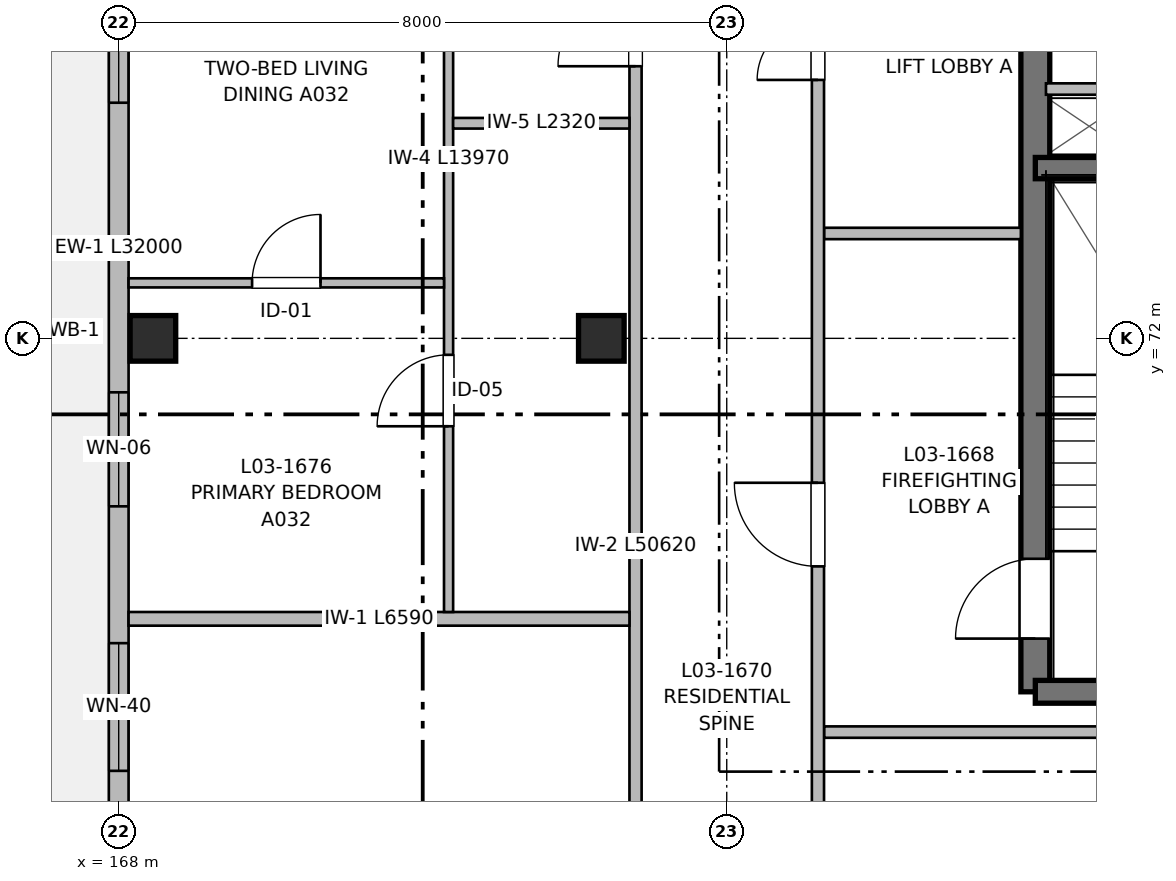
"""IFC4 building model, lengths in metres.
Left out: names, types, materials, properties, quantities, classifications, styles, units other than length and angle.
Written with IfcOpenShell. Run it as: python <this file> out.ifc"""

import sys

from ifc_helpers import new_model, si_unit, direction, frame, frame_2d, origin, origin_2d, place, context, subcontext, project, spatial, rectangle, extrude, element, fill, save


model = new_model("IFC4")
c1 = context("Model", 3, precision=1e-05, world=origin(), true_north=direction((0.0, 1.0)))
c2 = subcontext(c1, "Body", "Model", "MODEL_VIEW")
j1 = project(units=[si_unit("LENGTHUNIT", "METRE"), si_unit("PLANEANGLEUNIT", "RADIAN")], contexts=[c1])
p1 = place(None, origin())
s1 = spatial("IfcSite", under=j1, at=p1, CompositionType="ELEMENT")
p2 = place(p1, origin())
s2 = spatial("IfcBuilding", under=s1, at=p2, CompositionType="ELEMENT")
p3 = place(p2, frame((0.0, 0.0, 10.56)))
s3 = spatial("IfcBuildingStorey", under=s2, at=p3, CompositionType="ELEMENT", Elevation=10.56)
for number, where, z_axis, x_axis in (
    (1, (168.45, 72.0, 0.0), (0.0, 0.0, 1.0), (1.0, 0.0, 0.0)),
    (2, (174.35, 72.0, 0.0), (0.0, 0.0, 1.0), (1.0, 0.0, 0.0)),
):
    element("IfcColumn", number, at=place(p3, frame(where, z_axis=z_axis, x_axis=x_axis)), inside=s3, PredefinedType="COLUMN", context=c2, shape_type="SweptSolid", body=[
        extrude(rectangle(XDim=0.6, YDim=0.6, at=origin_2d()), origin(), (0.0, 0.0, 1.0), 3.2),
    ])
p4 = place(p3, frame((180.06, 67.35, 0.0), z_axis=(0.0, 0.0, 1.0), x_axis=(0.0, 1.0, 0.0)))
e3 = element("IfcWall", 3, at=p4, inside=s3, PredefinedType="SHEAR", context=c2, shape_type="SweptSolid", body=[
    extrude(rectangle(XDim=13.15, YDim=0.38, at=frame_2d((6.575, 0.0))), origin(), (0.0, 0.0, 1.0), 3.2),
])
p5 = place(p4, frame((0.7, 0.0, 0.0)))
e4 = element("IfcOpeningElement", 4, at=p5, cuts=e3, PredefinedType="OPENING", context=c2, shape_type="SweptSolid", body=[
    extrude(rectangle(XDim=1.05, YDim=2.15, at=frame_2d((0.525, 1.075))), frame((0.0, 0.2, 0.0), z_axis=(0.0, -1.0, 0.0), x_axis=(1.0, 0.0, 0.0)), (0.0, 0.0, 1.0), 0.4),
])
p6 = place(p3, frame((183.47, 67.35, 0.0), z_axis=(0.0, 0.0, 1.0), x_axis=(-1.0, 0.0, 0.0)))
e5 = element("IfcWall", 5, at=p6, inside=s3, PredefinedType="SHEAR", context=c2, shape_type="SweptSolid", body=[
    extrude(rectangle(XDim=3.41, YDim=0.3, at=frame_2d((1.705, 0.0))), origin(), (0.0, 0.0, 1.0), 3.2),
])
p7 = place(p3, frame((180.06, 74.24, 0.0), z_axis=(0.0, 0.0, 1.0), x_axis=(1.0, 0.0, 0.0)))
e6 = element("IfcWall", 6, at=p7, inside=s3, PredefinedType="SHEAR", context=c2, shape_type="SweptSolid", body=[
    extrude(rectangle(XDim=3.41, YDim=0.28, at=frame_2d((1.705, 0.0))), origin(), (0.0, 0.0, 1.0), 3.2),
])
p8 = place(p3, frame((180.2, 75.28, 0.0), z_axis=(0.0, 0.0, 1.0), x_axis=(1.0, 0.0, 0.0)))
e7 = element("IfcWall", 7, at=p8, inside=s3, PredefinedType="PARTITIONING", context=c2, shape_type="SweptSolid", body=[
    extrude(rectangle(XDim=1.13, YDim=0.15, at=frame_2d((0.565, 0.0))), origin(), (0.0, 0.0, 1.0), 2.95),
])
p9 = place(p3, frame((168.0, 56.0, 0.0), z_axis=(0.0, 0.0, 1.0), x_axis=(0.0, 1.0, 0.0)))
e8 = element("IfcWall", 8, at=p9, inside=s3, PredefinedType="SOLIDWALL", context=c2, shape_type="SweptSolid", body=[
    extrude(rectangle(XDim=32.0, YDim=0.26, at=frame_2d((16.0, 0.0))), origin(), (0.0, 0.0, 1.0), 2.98),
])
p10 = place(p9, frame((3.4, 0.0, 0.0)))
e9 = element("IfcOpeningElement", 9, at=p10, cuts=e8, PredefinedType="OPENING", context=c2, shape_type="SweptSolid", body=[
    extrude(rectangle(XDim=1.2, YDim=2.2, at=frame_2d((0.6, 1.1))), frame((0.0, 0.14, 0.0), z_axis=(0.0, -1.0, 0.0), x_axis=(1.0, 0.0, 0.0)), (0.0, 0.0, 1.0), 0.28),
])
p11 = place(p9, frame((5.3, 0.0, 0.87)))
e10 = element("IfcOpeningElement", 10, at=p11, cuts=e8, PredefinedType="OPENING", context=c2, shape_type="SweptSolid", body=[
    extrude(rectangle(XDim=1.4, YDim=1.35, at=frame_2d((0.7, 0.675))), frame((0.0, 0.14, 0.0), z_axis=(0.0, -1.0, 0.0), x_axis=(1.0, 0.0, 0.0)), (0.0, 0.0, 1.0), 0.28),
])
p12 = place(p9, frame((10.31, 0.0, 0.72)))
e11 = element("IfcOpeningElement", 11, at=p12, cuts=e8, PredefinedType="OPENING", context=c2, shape_type="SweptSolid", body=[
    extrude(rectangle(XDim=1.68, YDim=1.5, at=frame_2d((0.84, 0.75))), frame((0.0, 0.14, 0.0), z_axis=(0.0, -1.0, 0.0), x_axis=(1.0, 0.0, 0.0)), (0.0, 0.0, 1.0), 0.28),
])
p13 = place(p9, frame((19.1, 0.0, 0.72)))
e12 = element("IfcOpeningElement", 12, at=p13, cuts=e8, PredefinedType="OPENING", context=c2, shape_type="SweptSolid", body=[
    extrude(rectangle(XDim=1.8, YDim=1.5, at=frame_2d((0.9, 0.75))), frame((0.0, 0.14, 0.0), z_axis=(0.0, -1.0, 0.0), x_axis=(1.0, 0.0, 0.0)), (0.0, 0.0, 1.0), 0.28),
])
p14 = place(p9, frame((27.0, 0.0, 0.72)))
e13 = element("IfcOpeningElement", 13, at=p14, cuts=e8, PredefinedType="OPENING", context=c2, shape_type="SweptSolid", body=[
    extrude(rectangle(XDim=2.0, YDim=1.5, at=frame_2d((1.0, 0.75))), frame((0.0, 0.14, 0.0), z_axis=(0.0, -1.0, 0.0), x_axis=(1.0, 0.0, 0.0)), (0.0, 0.0, 1.0), 0.28),
])
p15 = place(p9, frame((13.79, 0.0, 0.82)))
e14 = element("IfcOpeningElement", 14, at=p15, cuts=e8, PredefinedType="OPENING", context=c2, shape_type="SweptSolid", body=[
    extrude(rectangle(XDim=1.5, YDim=1.4, at=frame_2d((0.75, 0.7))), frame((0.0, 0.14, 0.0), z_axis=(0.0, -1.0, 0.0), x_axis=(1.0, 0.0, 0.0)), (0.0, 0.0, 1.0), 0.28),
])
p16 = place(p9, frame((24.43, 0.0, 0.82)))
e15 = element("IfcOpeningElement", 15, at=p16, cuts=e8, PredefinedType="OPENING", context=c2, shape_type="SweptSolid", body=[
    extrude(rectangle(XDim=1.5, YDim=1.4, at=frame_2d((0.75, 0.7))), frame((0.0, 0.14, 0.0), z_axis=(0.0, -1.0, 0.0), x_axis=(1.0, 0.0, 0.0)), (0.0, 0.0, 1.0), 0.28),
])
p17 = place(p9, frame((30.895, 0.0, 0.9)))
e16 = element("IfcOpeningElement", 16, at=p17, cuts=e8, PredefinedType="OPENING", context=c2, shape_type="SweptSolid", body=[
    extrude(rectangle(XDim=0.65, YDim=0.95, at=frame_2d((0.325, 0.475))), frame((0.0, 0.14, 0.0), z_axis=(0.0, -1.0, 0.0), x_axis=(1.0, 0.0, 0.0)), (0.0, 0.0, 1.0), 0.28),
])
p18 = place(p3, frame((177.28, 66.82, 0.0), z_axis=(0.0, 0.0, 1.0), x_axis=(1.0, 0.0, 0.0)))
e17 = element("IfcWall", 17, at=p18, inside=s3, PredefinedType="PARTITIONING", context=c2, shape_type="SweptSolid", body=[
    extrude(rectangle(XDim=6.59, YDim=0.15, at=frame_2d((3.295, 0.0))), origin(), (0.0, 0.0, 1.0), 2.935),
])
p19 = place(p3, frame((177.28, 73.38, 0.0), z_axis=(0.0, 0.0, 1.0), x_axis=(1.0, 0.0, 0.0)))
e18 = element("IfcWall", 18, at=p19, inside=s3, PredefinedType="PARTITIONING", context=c2, shape_type="SweptSolid", body=[
    extrude(rectangle(XDim=2.59, YDim=0.15, at=frame_2d((1.295, 0.0))), origin(), (0.0, 0.0, 1.0), 2.935),
])
p20 = place(p3, frame((174.8, 56.18, 0.0), z_axis=(0.0, 0.0, 1.0), x_axis=(0.0, 1.0, 0.0)))
e19 = element("IfcWall", 19, at=p20, inside=s3, PredefinedType="PARTITIONING", context=c2, shape_type="SweptSolid", body=[
    extrude(rectangle(XDim=50.62, YDim=0.16, at=frame_2d((25.31, 0.0))), origin(), (0.0, 0.0, 1.0), 2.935),
])
p21 = place(p20, frame((5.27, 0.0, 0.0)))
e20 = element("IfcOpeningElement", 20, at=p21, cuts=e19, PredefinedType="OPENING", context=c2, shape_type="SweptSolid", body=[
    extrude(rectangle(XDim=1.5, YDim=2.2, at=frame_2d((0.75, 1.1))), frame((0.0, 0.09, 0.0), z_axis=(0.0, -1.0, 0.0), x_axis=(1.0, 0.0, 0.0)), (0.0, 0.0, 1.0), 0.18),
])
p22 = place(p20, frame((19.4, 0.0, 0.0)))
e21 = element("IfcOpeningElement", 21, at=p22, cuts=e19, PredefinedType="OPENING", context=c2, shape_type="SweptSolid", body=[
    extrude(rectangle(XDim=1.02, YDim=2.15, at=frame_2d((0.51, 1.075))), frame((0.0, 0.09, 0.0), z_axis=(0.0, -1.0, 0.0), x_axis=(1.0, 0.0, 0.0)), (0.0, 0.0, 1.0), 0.18),
])
p23 = place(p20, frame((33.08, 0.0, 0.0)))
e22 = element("IfcOpeningElement", 22, at=p23, cuts=e19, PredefinedType="OPENING", context=c2, shape_type="SweptSolid", body=[
    extrude(rectangle(XDim=0.98, YDim=2.15, at=frame_2d((0.49, 1.075))), frame((0.0, 0.09, 0.0), z_axis=(0.0, -1.0, 0.0), x_axis=(1.0, 0.0, 0.0)), (0.0, 0.0, 1.0), 0.18),
])
p24 = place(p20, frame((45.33, 0.0, 0.0)))
e23 = element("IfcOpeningElement", 23, at=p24, cuts=e19, PredefinedType="OPENING", context=c2, shape_type="SweptSolid", body=[
    extrude(rectangle(XDim=0.98, YDim=2.15, at=frame_2d((0.49, 1.075))), frame((0.0, 0.09, 0.0), z_axis=(0.0, -1.0, 0.0), x_axis=(1.0, 0.0, 0.0)), (0.0, 0.0, 1.0), 0.18),
])
p25 = place(p3, frame((177.2, 56.18, 0.0), z_axis=(0.0, 0.0, 1.0), x_axis=(0.0, 1.0, 0.0)))
e24 = element("IfcWall", 24, at=p25, inside=s3, PredefinedType="PARTITIONING", context=c2, shape_type="SweptSolid", body=[
    extrude(rectangle(XDim=50.62, YDim=0.16, at=frame_2d((25.31, 0.0))), origin(), (0.0, 0.0, 1.0), 2.935),
])
p26 = place(p25, frame((12.82, 0.0, 0.0)))
e25 = element("IfcOpeningElement", 25, at=p26, cuts=e24, PredefinedType="OPENING", context=c2, shape_type="SweptSolid", body=[
    extrude(rectangle(XDim=1.1, YDim=2.15, at=frame_2d((0.55, 1.075))), frame((0.0, 0.09, 0.0), z_axis=(0.0, -1.0, 0.0), x_axis=(1.0, 0.0, 0.0)), (0.0, 0.0, 1.0), 0.18),
])
p27 = place(p25, frame((19.22, 0.0, 0.0)))
e26 = element("IfcOpeningElement", 26, at=p27, cuts=e24, PredefinedType="OPENING", context=c2, shape_type="SweptSolid", body=[
    extrude(rectangle(XDim=1.6, YDim=2.15, at=frame_2d((0.8, 1.075))), frame((0.0, 0.09, 0.0), z_axis=(0.0, -1.0, 0.0), x_axis=(1.0, 0.0, 0.0)), (0.0, 0.0, 1.0), 0.18),
])
p28 = place(p25, frame((1.8, 0.0, 0.0)))
e27 = element("IfcOpeningElement", 27, at=p28, cuts=e24, PredefinedType="OPENING", context=c2, shape_type="SweptSolid", body=[
    extrude(rectangle(XDim=0.96, YDim=2.15, at=frame_2d((0.48, 1.075))), frame((0.0, 0.09, 0.0), z_axis=(0.0, -1.0, 0.0), x_axis=(1.0, 0.0, 0.0)), (0.0, 0.0, 1.0), 0.18),
])
p29 = place(p25, frame((32.55, 0.0, 0.0)))
e28 = element("IfcOpeningElement", 28, at=p29, cuts=e24, PredefinedType="OPENING", context=c2, shape_type="SweptSolid", body=[
    extrude(rectangle(XDim=0.98, YDim=2.15, at=frame_2d((0.49, 1.075))), frame((0.0, 0.09, 0.0), z_axis=(0.0, -1.0, 0.0), x_axis=(1.0, 0.0, 0.0)), (0.0, 0.0, 1.0), 0.18),
])
p30 = place(p25, frame((40.81, 0.0, 0.0)))
e29 = element("IfcOpeningElement", 29, at=p30, cuts=e24, PredefinedType="OPENING", context=c2, shape_type="SweptSolid", body=[
    extrude(rectangle(XDim=0.98, YDim=2.15, at=frame_2d((0.49, 1.075))), frame((0.0, 0.09, 0.0), z_axis=(0.0, -1.0, 0.0), x_axis=(1.0, 0.0, 0.0)), (0.0, 0.0, 1.0), 0.18),
])
p31 = place(p3, frame((168.13, 68.31, 0.0), z_axis=(0.0, 0.0, 1.0), x_axis=(1.0, 0.0, 0.0)))
e30 = element("IfcWall", 30, at=p31, inside=s3, PredefinedType="PARTITIONING", context=c2, shape_type="SweptSolid", body=[
    extrude(rectangle(XDim=6.59, YDim=0.18, at=frame_2d((3.295, 0.0))), origin(), (0.0, 0.0, 1.0), 2.935),
])
p32 = place(p3, frame((172.34, 68.4, 0.0), z_axis=(0.0, 0.0, 1.0), x_axis=(0.0, 1.0, 0.0)))
e31 = element("IfcWall", 31, at=p32, inside=s3, PredefinedType="PARTITIONING", context=c2, shape_type="SweptSolid", body=[
    extrude(rectangle(XDim=13.97, YDim=0.12, at=frame_2d((6.985, 0.0))), origin(), (0.0, 0.0, 1.0), 2.935),
])
p33 = place(p32, frame((2.443, 0.0, 0.0)))
e32 = element("IfcOpeningElement", 32, at=p33, cuts=e31, PredefinedType="OPENING", context=c2, shape_type="SweptSolid", body=[
    extrude(rectangle(XDim=0.94, YDim=2.1, at=frame_2d((0.47, 1.05))), frame((0.0, 0.07, 0.0), z_axis=(0.0, -1.0, 0.0), x_axis=(1.0, 0.0, 0.0)), (0.0, 0.0, 1.0), 0.14),
])
p34 = place(p32, frame((8.541, 0.0, 0.0)))
e33 = element("IfcOpeningElement", 33, at=p34, cuts=e31, PredefinedType="OPENING", context=c2, shape_type="SweptSolid", body=[
    extrude(rectangle(XDim=0.92, YDim=2.1, at=frame_2d((0.46, 1.05))), frame((0.0, 0.07, 0.0), z_axis=(0.0, -1.0, 0.0), x_axis=(1.0, 0.0, 0.0)), (0.0, 0.0, 1.0), 0.14),
])
p35 = place(p3, frame((172.4, 74.83, 0.0), z_axis=(0.0, 0.0, 1.0), x_axis=(1.0, 0.0, 0.0)))
e34 = element("IfcWall", 34, at=p35, inside=s3, PredefinedType="PARTITIONING", context=c2, shape_type="SweptSolid", body=[
    extrude(rectangle(XDim=2.32, YDim=0.14, at=frame_2d((1.16, 0.0))), origin(), (0.0, 0.0, 1.0), 2.935),
])
p36 = place(p3, frame((168.13, 72.73, 0.0), z_axis=(0.0, 0.0, 1.0), x_axis=(1.0, 0.0, 0.0)))
e35 = element("IfcWall", 35, at=p36, inside=s3, PredefinedType="PARTITIONING", context=c2, shape_type="SweptSolid", body=[
    extrude(rectangle(XDim=4.15, YDim=0.12, at=frame_2d((2.075, 0.0))), origin(), (0.0, 0.0, 1.0), 2.935),
])
p37 = place(p36, frame((1.625, 0.0, 0.0)))
e36 = element("IfcOpeningElement", 36, at=p37, cuts=e35, PredefinedType="OPENING", context=c2, shape_type="SweptSolid", body=[
    extrude(rectangle(XDim=0.9, YDim=2.1, at=frame_2d((0.45, 1.05))), frame((0.0, 0.07, 0.0), z_axis=(0.0, -1.0, 0.0), x_axis=(1.0, 0.0, 0.0)), (0.0, 0.0, 1.0), 0.14),
])
p38 = place(p5, origin())
e37 = element("IfcDoor", 37, at=p38, inside=s3, OperationType="SINGLE_SWING_LEFT", PredefinedType="DOOR", context=c2, shape_type="SweptSolid", body=[
    extrude(rectangle(XDim=1.05, YDim=2.15, at=frame_2d((0.525, 1.075))), frame((0.0, 0.025, 0.0), z_axis=(0.0, -1.0, 0.0), x_axis=(1.0, 0.0, 0.0)), (0.0, 0.0, 1.0), 0.05),
])
fill(e4, e37)
p39 = place(p12, origin())
e38 = element("IfcWindow", 38, at=p39, inside=s3, PartitioningType="SINGLE_PANEL", PredefinedType="WINDOW", context=c2, shape_type="SweptSolid", body=[
    extrude(rectangle(XDim=1.68, YDim=1.5, at=frame_2d((0.84, 0.75))), frame((0.0, 0.03, 0.0), z_axis=(0.0, -1.0, 0.0), x_axis=(1.0, 0.0, 0.0)), (0.0, 0.0, 1.0), 0.06),
])
fill(e11, e38)
p40 = place(p13, origin())
e39 = element("IfcWindow", 39, at=p40, inside=s3, PartitioningType="SINGLE_PANEL", PredefinedType="WINDOW", context=c2, shape_type="SweptSolid", body=[
    extrude(rectangle(XDim=1.8, YDim=1.5, at=frame_2d((0.9, 0.75))), frame((0.0, 0.03, 0.0), z_axis=(0.0, -1.0, 0.0), x_axis=(1.0, 0.0, 0.0)), (0.0, 0.0, 1.0), 0.06),
])
fill(e12, e39)
p41 = place(p26, origin())
e40 = element("IfcDoor", 40, at=p41, inside=s3, OperationType="SINGLE_SWING_RIGHT", PredefinedType="DOOR", context=c2, shape_type="SweptSolid", body=[
    extrude(rectangle(XDim=1.1, YDim=2.15, at=frame_2d((0.55, 1.075))), frame((0.0, 0.025, 0.0), z_axis=(0.0, -1.0, 0.0), x_axis=(1.0, 0.0, 0.0)), (0.0, 0.0, 1.0), 0.05),
])
fill(e25, e40)
p42 = place(p27, origin())
e41 = element("IfcDoor", 41, at=p42, inside=s3, OperationType="DOUBLE_DOOR_SINGLE_SWING", PredefinedType="DOOR", context=c2, shape_type="SweptSolid", body=[
    extrude(rectangle(XDim=1.6, YDim=2.15, at=frame_2d((0.8, 1.075))), frame((0.0, 0.025, 0.0), z_axis=(0.0, -1.0, 0.0), x_axis=(1.0, 0.0, 0.0)), (0.0, 0.0, 1.0), 0.05),
])
fill(e26, e41)
p43 = place(p33, origin())
e42 = element("IfcDoor", 42, at=p43, inside=s3, OperationType="SINGLE_SWING_LEFT", PredefinedType="DOOR", context=c2, shape_type="SweptSolid", body=[
    extrude(rectangle(XDim=0.94, YDim=2.1, at=frame_2d((0.47, 1.05))), frame((0.0, 0.025, 0.0), z_axis=(0.0, -1.0, 0.0), x_axis=(1.0, 0.0, 0.0)), (0.0, 0.0, 1.0), 0.05),
])
fill(e32, e42)
p44 = place(p22, origin())
e43 = element("IfcDoor", 43, at=p44, inside=s3, OperationType="SINGLE_SWING_LEFT", PredefinedType="DOOR", context=c2, shape_type="SweptSolid", body=[
    extrude(rectangle(XDim=1.02, YDim=2.15, at=frame_2d((0.51, 1.075))), frame((0.0, 0.025, 0.0), z_axis=(0.0, -1.0, 0.0), x_axis=(1.0, 0.0, 0.0)), (0.0, 0.0, 1.0), 0.05),
])
fill(e21, e43)
p45 = place(p37, origin())
e44 = element("IfcDoor", 44, at=p45, inside=s3, OperationType="SINGLE_SWING_RIGHT", PredefinedType="DOOR", context=c2, shape_type="SweptSolid", body=[
    extrude(rectangle(XDim=0.9, YDim=2.1, at=frame_2d((0.45, 1.05))), frame((0.0, 0.025, 0.0), z_axis=(0.0, -1.0, 0.0), x_axis=(1.0, 0.0, 0.0)), (0.0, 0.0, 1.0), 0.05),
])
fill(e36, e44)
p46 = place(p15, origin())
e45 = element("IfcWindow", 45, at=p46, inside=s3, PartitioningType="SINGLE_PANEL", PredefinedType="WINDOW", context=c2, shape_type="SweptSolid", body=[
    extrude(rectangle(XDim=1.5, YDim=1.4, at=frame_2d((0.75, 0.7))), frame((0.0, 0.03, 0.0), z_axis=(0.0, -1.0, 0.0), x_axis=(1.0, 0.0, 0.0)), (0.0, 0.0, 1.0), 0.06),
])
fill(e14, e45)
save(model, sys.argv[1])
